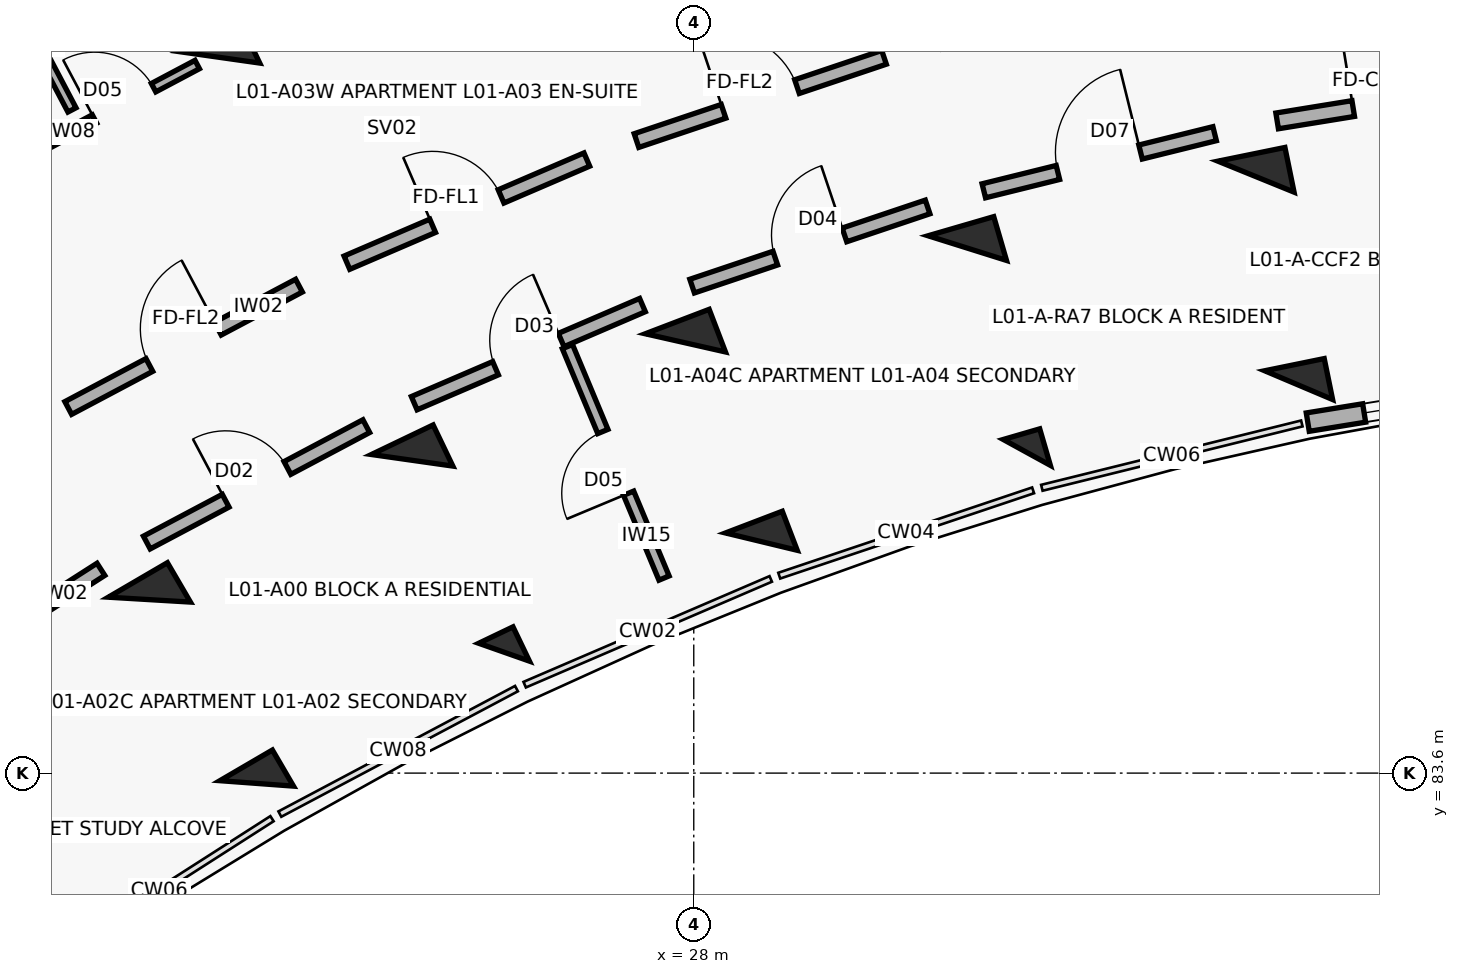
"""IFC4 building model, lengths in metres.
Left out: names, types, materials, properties, quantities, classifications, styles, units other than length and angle.
Written with IfcOpenShell. Run it as: python <this file> out.ifc"""

import sys

from ifc_helpers import new_model, si_unit, direction, frame, frame_2d, origin, origin_2d, place, context, subcontext, project, spatial, rectangle, extrude, element, fill, save


model = new_model("IFC4")
c1 = context("Model", 3, precision=1e-05, world=origin(), true_north=direction((0.0, 1.0)))
c2 = subcontext(c1, "Body", "Model", "MODEL_VIEW")
j1 = project(units=[si_unit("LENGTHUNIT", "METRE"), si_unit("PLANEANGLEUNIT", "RADIAN")], contexts=[c1])
p1 = place(None, origin())
s1 = spatial("IfcSite", under=j1, at=p1, CompositionType="ELEMENT")
p2 = place(p1, origin())
s2 = spatial("IfcBuilding", under=s1, at=p2, CompositionType="ELEMENT")
p3 = place(p2, frame((0.0, 0.0, 4.5)))
s3 = spatial("IfcBuildingStorey", under=s2, at=p3, CompositionType="ELEMENT", Elevation=4.5)
p4 = place(p3, frame((22.249, 83.464, 0.0), z_axis=(0.0, 0.0, 1.0), x_axis=(-0.504226211181, 0.863571611366, 0.0)))
e1 = element("IfcColumn", 1, at=p4, inside=s3, PredefinedType="COLUMN", context=c2, shape_type="SweptSolid", body=[
    extrude(rectangle(XDim=0.55, YDim=0.8, at=origin_2d()), origin(), (0.0, 0.0, 1.0), 3.6),
])
p5 = place(p3, frame((20.837, 85.882, 0.0), z_axis=(0.0, 0.0, 1.0), x_axis=(-0.504226211181, 0.863571611366, 0.0)))
e2 = element("IfcColumn", 2, at=p5, inside=s3, PredefinedType="COLUMN", context=c2, shape_type="SweptSolid", body=[
    extrude(rectangle(XDim=0.6, YDim=0.9, at=origin_2d()), origin(), (0.0, 0.0, 1.0), 3.6),
])
p6 = place(p3, frame((25.504, 85.191, 0.0), z_axis=(0.0, 0.0, 1.0), x_axis=(-0.432085748802, 0.901832526405, 0.0)))
e3 = element("IfcColumn", 3, at=p6, inside=s3, PredefinedType="COLUMN", context=c2, shape_type="SweptSolid", body=[
    extrude(rectangle(XDim=0.5, YDim=0.5, at=origin_2d()), origin(), (0.0, 0.0, 1.0), 3.6),
])
for number, where, z_axis, x_axis in (
    (4, (24.294, 87.716, 0.0), (0.0, 0.0, 1.0), (-0.432, 0.902, 0.0)),
    (5, (21.754, 93.019, 0.0), (0.0, 0.0, 1.0), (-0.432, 0.902, 0.0)),
):
    element("IfcColumn", number, at=place(p3, frame(where, z_axis=z_axis, x_axis=x_axis)), inside=s3, PredefinedType="COLUMN", context=c2, shape_type="SweptSolid", body=[
        extrude(rectangle(XDim=0.6, YDim=0.9, at=origin_2d()), origin(), (0.0, 0.0, 1.0), 3.6),
    ])
p7 = place(p3, frame((28.889, 86.646, 0.0), z_axis=(0.0, 0.0, 1.0), x_axis=(-0.357064076459, 0.934079892355, 0.0)))
e6 = element("IfcColumn", 6, at=p7, inside=s3, PredefinedType="COLUMN", context=c2, shape_type="SweptSolid", body=[
    extrude(rectangle(XDim=0.55, YDim=0.8, at=origin_2d()), origin(), (0.0, 0.0, 1.0), 3.6),
])
p8 = place(p3, frame((27.889, 89.261, 0.0), z_axis=(0.0, 0.0, 1.0), x_axis=(-0.357064076459, 0.934079892355, 0.0)))
e7 = element("IfcColumn", 7, at=p8, inside=s3, PredefinedType="COLUMN", context=c2, shape_type="SweptSolid", body=[
    extrude(rectangle(XDim=0.6, YDim=0.9, at=origin_2d()), origin(), (0.0, 0.0, 1.0), 3.6),
])
p9 = place(p3, frame((32.382, 87.82, 0.0), z_axis=(0.0, 0.0, 1.0), x_axis=(-0.27966144946, 0.96009867914, 0.0)))
e8 = element("IfcColumn", 8, at=p9, inside=s3, PredefinedType="COLUMN", context=c2, shape_type="SweptSolid", body=[
    extrude(rectangle(XDim=0.5, YDim=0.5, at=origin_2d()), origin(), (0.0, 0.0, 1.0), 3.6),
])
p10 = place(p3, frame((31.599, 90.508, 0.0), z_axis=(0.0, 0.0, 1.0), x_axis=(-0.27966144946, 0.96009867914, 0.0)))
e9 = element("IfcColumn", 9, at=p10, inside=s3, PredefinedType="COLUMN", context=c2, shape_type="SweptSolid", body=[
    extrude(rectangle(XDim=0.6, YDim=0.9, at=origin_2d()), origin(), (0.0, 0.0, 1.0), 3.6),
])
p11 = place(p3, frame((35.958, 88.705, 0.0), z_axis=(0.0, 0.0, 1.0), x_axis=(-0.200393999665, 0.979715389742, 0.0)))
e10 = element("IfcColumn", 10, at=p11, inside=s3, PredefinedType="COLUMN", context=c2, shape_type="SweptSolid", body=[
    extrude(rectangle(XDim=0.55, YDim=0.8, at=origin_2d()), origin(), (0.0, 0.0, 1.0), 3.6),
])
p12 = place(p3, frame((35.397, 91.448, 0.0), z_axis=(0.0, 0.0, 1.0), x_axis=(-0.200393999665, 0.979715389742, 0.0)))
e11 = element("IfcColumn", 11, at=p12, inside=s3, PredefinedType="COLUMN", context=c2, shape_type="SweptSolid", body=[
    extrude(rectangle(XDim=0.6, YDim=0.9, at=origin_2d()), origin(), (0.0, 0.0, 1.0), 3.6),
])
p13 = place(p3, frame((36.078, 88.218, 0.0), z_axis=(0.0, 0.0, 1.0), x_axis=(0.987080874485, 0.160222804952, 0.0)))
e12 = element("IfcWall", 12, at=p13, inside=s3, PredefinedType="SOLIDWALL", context=c2, shape_type="SweptSolid", body=[
    extrude(rectangle(XDim=3.604, YDim=0.245, at=frame_2d((1.802, 0.0))), origin(), (0.0, 0.0, 1.0), 2.6),
])
p14 = place(p13, frame((0.752, 0.0, 0.32)))
e13 = element("IfcOpeningElement", 13, at=p14, cuts=e12, PredefinedType="OPENING", context=c2, shape_type="SweptSolid", body=[
    extrude(rectangle(XDim=2.1, YDim=1.65, at=frame_2d((1.05, 0.825))), frame((0.0, 0.133, 0.0), z_axis=(0.0, -1.0, 0.0), x_axis=(1.0, 0.0, 0.0)), (0.0, 0.0, 1.0), 0.265),
])
p15 = place(p3, frame((17.447, 84.519, 0.0), z_axis=(0.0, 0.0, 1.0), x_axis=(0.842225276846, 0.539125758095, 0.0)))
e14 = element("IfcWall", 14, at=p15, inside=s3, PredefinedType="SOLIDWALL", context=c2, shape_type="SweptSolid", body=[
    extrude(rectangle(XDim=3.269, YDim=0.19, at=frame_2d((1.634, 0.0))), origin(), (0.0, 0.0, 1.0), 2.58),
])
p16 = place(p15, frame((1.184, 0.0, 0.0)))
e15 = element("IfcOpeningElement", 15, at=p16, cuts=e14, PredefinedType="OPENING", context=c2, shape_type="SweptSolid", body=[
    extrude(rectangle(XDim=0.9, YDim=2.1, at=frame_2d((0.45, 1.05))), frame((0.0, 0.105, 0.0), z_axis=(0.0, -1.0, 0.0), x_axis=(1.0, 0.0, 0.0)), (0.0, 0.0, 1.0), 0.21),
])
p17 = place(p3, frame((19.77, 88.404, 0.0), z_axis=(0.0, 0.0, 1.0), x_axis=(0.883410853063, 0.468599258099, 0.0)))
e16 = element("IfcWall", 16, at=p17, inside=s3, PredefinedType="SOLIDWALL", context=c2, shape_type="SweptSolid", body=[
    extrude(rectangle(XDim=3.436, YDim=0.19, at=frame_2d((1.718, 0.0))), origin(), (0.0, 0.0, 1.0), 2.58),
])
p18 = place(p17, frame((1.208, 0.0, 0.0)))
e17 = element("IfcOpeningElement", 17, at=p18, cuts=e16, PredefinedType="OPENING", context=c2, shape_type="SweptSolid", body=[
    extrude(rectangle(XDim=1.02, YDim=2.15, at=frame_2d((0.51, 1.075))), frame((0.0, 0.105, 0.0), z_axis=(0.0, -1.0, 0.0), x_axis=(1.0, 0.0, 0.0)), (0.0, 0.0, 1.0), 0.21),
])
p19 = place(p3, frame((20.804, 86.634, 0.0), z_axis=(0.0, 0.0, 1.0), x_axis=(0.883444301944, 0.468536194293, 0.0)))
e18 = element("IfcWall", 18, at=p19, inside=s3, PredefinedType="SOLIDWALL", context=c2, shape_type="SweptSolid", body=[
    extrude(rectangle(XDim=3.269, YDim=0.19, at=frame_2d((1.634, 0.0))), origin(), (0.0, 0.0, 1.0), 2.58),
])
p20 = place(p19, frame((1.174, 0.0, 0.0)))
e19 = element("IfcOpeningElement", 19, at=p20, cuts=e18, PredefinedType="OPENING", context=c2, shape_type="SweptSolid", body=[
    extrude(rectangle(XDim=0.92, YDim=2.1, at=frame_2d((0.46, 1.05))), frame((0.0, 0.105, 0.0), z_axis=(0.0, -1.0, 0.0), x_axis=(1.0, 0.0, 0.0)), (0.0, 0.0, 1.0), 0.21),
])
p21 = place(p3, frame((18.113, 91.144, 0.0), z_axis=(0.0, 0.0, 1.0), x_axis=(0.88341855112, 0.46858474531, 0.0)))
e20 = element("IfcWall", 20, at=p21, inside=s3, PredefinedType="PARTITIONING", context=c2, shape_type="SweptSolid", body=[
    extrude(rectangle(XDim=3.797, YDim=0.125, at=frame_2d((1.898, 0.0))), origin(), (0.0, 0.0, 1.0), 2.58),
])
p22 = place(p21, frame((0.65, 0.0, 0.0)))
e21 = element("IfcOpeningElement", 21, at=p22, cuts=e20, PredefinedType="OPENING", context=c2, shape_type="SweptSolid", body=[
    extrude(rectangle(XDim=0.9, YDim=2.1, at=frame_2d((0.45, 1.05))), frame((0.0, 0.073, 0.0), z_axis=(0.0, -1.0, 0.0), x_axis=(1.0, 0.0, 0.0)), (0.0, 0.0, 1.0), 0.145),
])
p23 = place(p21, frame((2.267, 0.0, 0.0)))
e22 = element("IfcOpeningElement", 22, at=p23, cuts=e20, PredefinedType="OPENING", context=c2, shape_type="SweptSolid", body=[
    extrude(rectangle(XDim=0.88, YDim=2.1, at=frame_2d((0.44, 1.05))), frame((0.0, 0.073, 0.0), z_axis=(0.0, -1.0, 0.0), x_axis=(1.0, 0.0, 0.0)), (0.0, 0.0, 1.0), 0.145),
])
p24 = place(p3, frame((19.819, 92.326, 0.0), z_axis=(0.0, 0.0, 1.0), x_axis=(-0.465849102717, 0.884864177995, 0.0)))
e23 = element("IfcWall", 23, at=p24, inside=s3, PredefinedType="PARTITIONING", context=c2, shape_type="SweptSolid", body=[
    extrude(rectangle(XDim=4.9, YDim=0.12, at=frame_2d((2.45, 0.0))), origin(), (0.0, 0.0, 1.0), 2.58),
])
p25 = place(p24, frame((1.965, 0.0, 0.0)))
e24 = element("IfcOpeningElement", 24, at=p25, cuts=e23, PredefinedType="OPENING", context=c2, shape_type="SweptSolid", body=[
    extrude(rectangle(XDim=0.97, YDim=2.1, at=frame_2d((0.485, 1.05))), frame((0.0, 0.07, 0.0), z_axis=(0.0, -1.0, 0.0), x_axis=(1.0, 0.0, 0.0)), (0.0, 0.0, 1.0), 0.14),
])
p26 = place(p3, frame((23.437, 90.316, 0.0), z_axis=(0.0, 0.0, 1.0), x_axis=(0.918718172399, 0.394913813008, 0.0)))
e25 = element("IfcWall", 25, at=p26, inside=s3, PredefinedType="SOLIDWALL", context=c2, shape_type="SweptSolid", body=[
    extrude(rectangle(XDim=3.436, YDim=0.19, at=frame_2d((1.718, 0.0))), origin(), (0.0, 0.0, 1.0), 2.58),
])
p27 = place(p26, frame((1.228, 0.0, 0.0)))
e26 = element("IfcOpeningElement", 26, at=p27, cuts=e25, PredefinedType="OPENING", context=c2, shape_type="SweptSolid", body=[
    extrude(rectangle(XDim=0.98, YDim=2.15, at=frame_2d((0.49, 1.075))), frame((0.0, 0.105, 0.0), z_axis=(0.0, -1.0, 0.0), x_axis=(1.0, 0.0, 0.0)), (0.0, 0.0, 1.0), 0.21),
])
p28 = place(p3, frame((24.322, 88.467, 0.0), z_axis=(0.0, 0.0, 1.0), x_axis=(0.918723391052, 0.394901672235, 0.0)))
e27 = element("IfcWall", 27, at=p28, inside=s3, PredefinedType="SOLIDWALL", context=c2, shape_type="SweptSolid", body=[
    extrude(rectangle(XDim=3.269, YDim=0.19, at=frame_2d((1.634, 0.0))), origin(), (0.0, 0.0, 1.0), 2.58),
])
p29 = place(p28, frame((1.164, 0.0, 0.0)))
e28 = element("IfcOpeningElement", 28, at=p29, cuts=e27, PredefinedType="OPENING", context=c2, shape_type="SweptSolid", body=[
    extrude(rectangle(XDim=0.94, YDim=2.1, at=frame_2d((0.47, 1.05))), frame((0.0, 0.105, 0.0), z_axis=(0.0, -1.0, 0.0), x_axis=(1.0, 0.0, 0.0)), (0.0, 0.0, 1.0), 0.21),
])
p30 = place(p3, frame((27.609, 86.166, 0.0), z_axis=(0.0, 0.0, 1.0), x_axis=(-0.385151143297, 0.922853507777, 0.0)))
e29 = element("IfcWall", 29, at=p30, inside=s3, PredefinedType="PARTITIONING", context=c2, shape_type="SweptSolid", body=[
    extrude(rectangle(XDim=3.3, YDim=0.145, at=frame_2d((1.65, 0.0))), origin(), (0.0, 0.0, 1.0), 2.58),
])
p31 = place(p30, frame((1.21, 0.0, 0.0)))
e30 = element("IfcOpeningElement", 30, at=p31, cuts=e29, PredefinedType="OPENING", context=c2, shape_type="SweptSolid", body=[
    extrude(rectangle(XDim=0.88, YDim=2.1, at=frame_2d((0.44, 1.05))), frame((0.0, 0.083, 0.0), z_axis=(0.0, -1.0, 0.0), x_axis=(1.0, 0.0, 0.0)), (0.0, 0.0, 1.0), 0.165),
])
p32 = place(p3, frame((27.247, 91.923, 0.0), z_axis=(0.0, 0.0, 1.0), x_axis=(0.947863007629, 0.318678080151, 0.0)))
e31 = element("IfcWall", 31, at=p32, inside=s3, PredefinedType="SOLIDWALL", context=c2, shape_type="SweptSolid", body=[
    extrude(rectangle(XDim=3.436, YDim=0.19, at=frame_2d((1.718, 0.0))), origin(), (0.0, 0.0, 1.0), 2.58),
])
p33 = place(p32, frame((1.208, 0.0, 0.0)))
e32 = element("IfcOpeningElement", 32, at=p33, cuts=e31, PredefinedType="OPENING", context=c2, shape_type="SweptSolid", body=[
    extrude(rectangle(XDim=1.02, YDim=2.15, at=frame_2d((0.51, 1.075))), frame((0.0, 0.105, 0.0), z_axis=(0.0, -1.0, 0.0), x_axis=(1.0, 0.0, 0.0)), (0.0, 0.0, 1.0), 0.21),
])
p34 = place(p3, frame((27.979, 90.008, 0.0), z_axis=(0.0, 0.0, 1.0), x_axis=(0.94787351033, 0.318646839643, 0.0)))
e33 = element("IfcWall", 33, at=p34, inside=s3, PredefinedType="SOLIDWALL", context=c2, shape_type="SweptSolid", body=[
    extrude(rectangle(XDim=3.269, YDim=0.19, at=frame_2d((1.634, 0.0))), origin(), (0.0, 0.0, 1.0), 2.58),
])
p35 = place(p34, frame((1.154, 0.0, 0.0)))
e34 = element("IfcOpeningElement", 34, at=p35, cuts=e33, PredefinedType="OPENING", context=c2, shape_type="SweptSolid", body=[
    extrude(rectangle(XDim=0.96, YDim=2.1, at=frame_2d((0.48, 1.05))), frame((0.0, 0.105, 0.0), z_axis=(0.0, -1.0, 0.0), x_axis=(1.0, 0.0, 0.0)), (0.0, 0.0, 1.0), 0.21),
])
p36 = place(p3, frame((31.816, 91.262, 0.0), z_axis=(0.0, 0.0, 1.0), x_axis=(0.970727194092, 0.240184751078, 0.0)))
e35 = element("IfcWall", 35, at=p36, inside=s3, PredefinedType="SOLIDWALL", context=c2, shape_type="SweptSolid", body=[
    extrude(rectangle(XDim=3.129, YDim=0.19, at=frame_2d((1.564, 0.0))), origin(), (0.0, 0.0, 1.0), 2.58),
])
p37 = place(p36, frame((1.004, 0.0, 0.0)))
e36 = element("IfcOpeningElement", 36, at=p37, cuts=e35, PredefinedType="OPENING", context=c2, shape_type="SweptSolid", body=[
    extrude(rectangle(XDim=1.12, YDim=2.15, at=frame_2d((0.56, 1.075))), frame((0.0, 0.105, 0.0), z_axis=(0.0, -1.0, 0.0), x_axis=(1.0, 0.0, 0.0)), (0.0, 0.0, 1.0), 0.21),
])
p38 = place(p3, frame((35.676, 92.181, 0.0), z_axis=(0.0, 0.0, 1.0), x_axis=(0.98707079686, 0.160284877599, 0.0)))
e37 = element("IfcWall", 37, at=p38, inside=s3, PredefinedType="SOLIDWALL", context=c2, shape_type="SweptSolid", body=[
    extrude(rectangle(XDim=3.129, YDim=0.21, at=frame_2d((1.564, 0.0))), origin(), (0.0, 0.0, 1.0), 2.58),
])
p39 = place(p38, frame((1.014, 0.0, 0.0)))
e38 = element("IfcOpeningElement", 38, at=p39, cuts=e37, PredefinedType="OPENING", context=c2, shape_type="SweptSolid", body=[
    extrude(rectangle(XDim=1.1, YDim=2.15, at=frame_2d((0.55, 1.075))), frame((0.0, 0.115, 0.0), z_axis=(0.0, -1.0, 0.0), x_axis=(1.0, 0.0, 0.0)), (0.0, 0.0, 1.0), 0.23),
])
p40 = place(p14, origin())
e39 = element("IfcWindow", 39, at=p40, inside=s3, PartitioningType="TRIPLE_PANEL_VERTICAL", PredefinedType="WINDOW", context=c2, shape_type="SweptSolid", body=[
    extrude(rectangle(XDim=2.1, YDim=1.65, at=frame_2d((1.05, 0.825))), frame((0.0, 0.03, 0.0), z_axis=(0.0, -1.0, 0.0), x_axis=(1.0, 0.0, 0.0)), (0.0, 0.0, 1.0), 0.06),
])
fill(e13, e39)
p41 = place(p18, origin())
e40 = element("IfcDoor", 40, at=p41, inside=s3, OperationType="SINGLE_SWING_RIGHT", PredefinedType="DOOR", context=c2, shape_type="SweptSolid", body=[
    extrude(rectangle(XDim=1.02, YDim=2.15, at=frame_2d((0.51, 1.075))), frame((0.0, 0.025, 0.0), z_axis=(0.0, -1.0, 0.0), x_axis=(1.0, 0.0, 0.0)), (0.0, 0.0, 1.0), 0.05),
])
fill(e17, e40)
p42 = place(p20, origin())
e41 = element("IfcDoor", 41, at=p42, inside=s3, OperationType="SINGLE_SWING_LEFT", PredefinedType="DOOR", context=c2, shape_type="SweptSolid", body=[
    extrude(rectangle(XDim=0.92, YDim=2.1, at=frame_2d((0.46, 1.05))), frame((0.0, 0.025, 0.0), z_axis=(0.0, -1.0, 0.0), x_axis=(1.0, 0.0, 0.0)), (0.0, 0.0, 1.0), 0.05),
])
fill(e19, e41)
p43 = place(p23, origin())
e42 = element("IfcDoor", 42, at=p43, inside=s3, OperationType="SINGLE_SWING_LEFT", PredefinedType="DOOR", context=c2, shape_type="SweptSolid", body=[
    extrude(rectangle(XDim=0.88, YDim=2.1, at=frame_2d((0.44, 1.05))), frame((0.0, 0.025, 0.0), z_axis=(0.0, -1.0, 0.0), x_axis=(1.0, 0.0, 0.0)), (0.0, 0.0, 1.0), 0.05),
])
fill(e22, e42)
p44 = place(p27, origin())
e43 = element("IfcDoor", 43, at=p44, inside=s3, OperationType="SINGLE_SWING_LEFT", PredefinedType="DOOR", context=c2, shape_type="SweptSolid", body=[
    extrude(rectangle(XDim=0.98, YDim=2.15, at=frame_2d((0.49, 1.075))), frame((0.0, 0.025, 0.0), z_axis=(0.0, -1.0, 0.0), x_axis=(1.0, 0.0, 0.0)), (0.0, 0.0, 1.0), 0.05),
])
fill(e26, e43)
p45 = place(p29, origin())
e44 = element("IfcDoor", 44, at=p45, inside=s3, OperationType="SINGLE_SWING_RIGHT", PredefinedType="DOOR", context=c2, shape_type="SweptSolid", body=[
    extrude(rectangle(XDim=0.94, YDim=2.1, at=frame_2d((0.47, 1.05))), frame((0.0, 0.025, 0.0), z_axis=(0.0, -1.0, 0.0), x_axis=(1.0, 0.0, 0.0)), (0.0, 0.0, 1.0), 0.05),
])
fill(e28, e44)
p46 = place(p31, origin())
e45 = element("IfcDoor", 45, at=p46, inside=s3, OperationType="SINGLE_SWING_LEFT", PredefinedType="DOOR", context=c2, shape_type="SweptSolid", body=[
    extrude(rectangle(XDim=0.88, YDim=2.1, at=frame_2d((0.44, 1.05))), frame((0.0, 0.025, 0.0), z_axis=(0.0, -1.0, 0.0), x_axis=(1.0, 0.0, 0.0)), (0.0, 0.0, 1.0), 0.05),
])
fill(e30, e45)
p47 = place(p33, origin())
e46 = element("IfcDoor", 46, at=p47, inside=s3, OperationType="SINGLE_SWING_LEFT", PredefinedType="DOOR", context=c2, shape_type="SweptSolid", body=[
    extrude(rectangle(XDim=1.02, YDim=2.15, at=frame_2d((0.51, 1.075))), frame((0.0, 0.025, 0.0), z_axis=(0.0, -1.0, 0.0), x_axis=(1.0, 0.0, 0.0)), (0.0, 0.0, 1.0), 0.05),
])
fill(e32, e46)
p48 = place(p35, origin())
e47 = element("IfcDoor", 47, at=p48, inside=s3, OperationType="SINGLE_SWING_RIGHT", PredefinedType="DOOR", context=c2, shape_type="SweptSolid", body=[
    extrude(rectangle(XDim=0.96, YDim=2.1, at=frame_2d((0.48, 1.05))), frame((0.0, 0.025, 0.0), z_axis=(0.0, -1.0, 0.0), x_axis=(1.0, 0.0, 0.0)), (0.0, 0.0, 1.0), 0.05),
])
fill(e34, e47)
p49 = place(p37, origin())
e48 = element("IfcDoor", 48, at=p49, inside=s3, OperationType="SINGLE_SWING_RIGHT", PredefinedType="DOOR", context=c2, shape_type="SweptSolid", body=[
    extrude(rectangle(XDim=1.12, YDim=2.15, at=frame_2d((0.56, 1.075))), frame((0.0, 0.025, 0.0), z_axis=(0.0, -1.0, 0.0), x_axis=(1.0, 0.0, 0.0)), (0.0, 0.0, 1.0), 0.05),
])
fill(e36, e48)
p50 = place(p39, origin())
e49 = element("IfcDoor", 49, at=p50, inside=s3, OperationType="SINGLE_SWING_LEFT", PredefinedType="DOOR", context=c2, shape_type="SweptSolid", body=[
    extrude(rectangle(XDim=1.1, YDim=2.15, at=frame_2d((0.55, 1.075))), frame((0.0, 0.025, 0.0), z_axis=(0.0, -1.0, 0.0), x_axis=(1.0, 0.0, 0.0)), (0.0, 0.0, 1.0), 0.05),
])
fill(e38, e49)
save(model, sys.argv[1])
